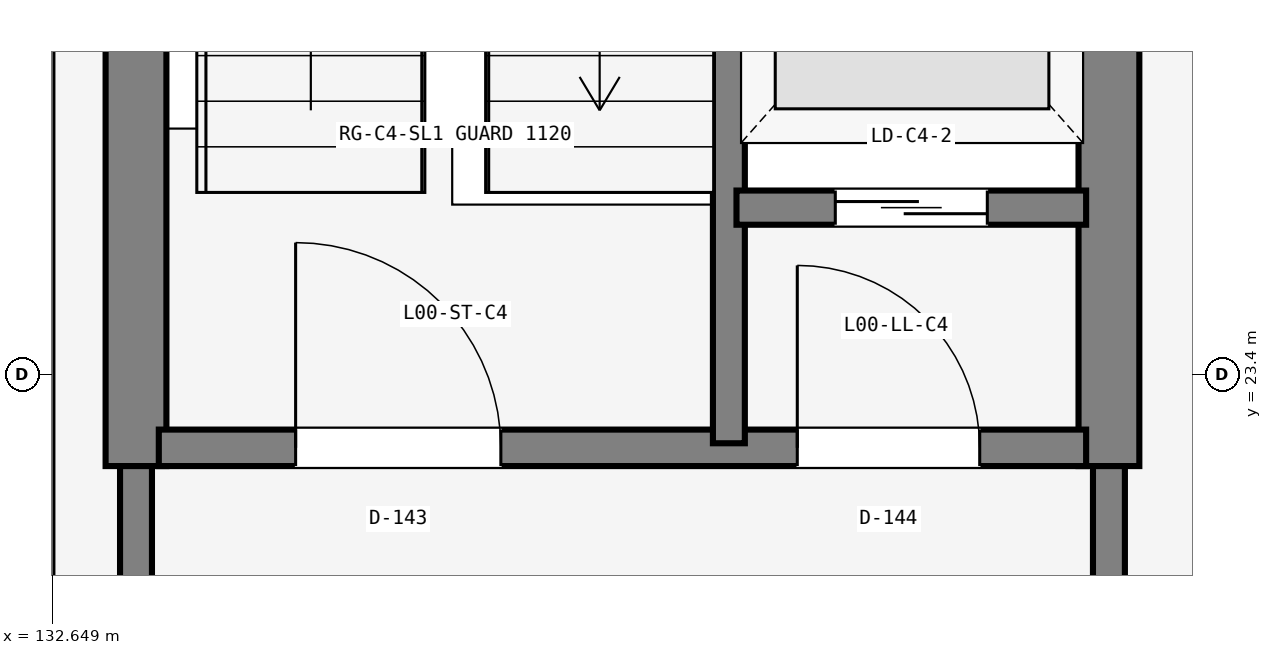
"""IFC4 building model, lengths in metres.
Left out: names, types, materials, properties, quantities, classifications, styles, units other than length and angle.
Written with IfcOpenShell. Run it as: python <this file> out.ifc"""

import sys

from ifc_helpers import new_model, si_unit, direction, frame, frame_2d, origin, origin_2d, place, context, subcontext, project, spatial, rectangle, extrude, element, fill, save


model = new_model("IFC4")
c1 = context("Model", 3, precision=1e-05, world=origin(), true_north=direction((0.0, 1.0)))
c2 = subcontext(c1, "Body", "Model", "MODEL_VIEW")
j1 = project(units=[si_unit("LENGTHUNIT", "METRE"), si_unit("PLANEANGLEUNIT", "RADIAN")], contexts=[c1])
p1 = place(None, origin())
s1 = spatial("IfcSite", under=j1, at=p1, CompositionType="ELEMENT")
p2 = place(p1, origin())
s2 = spatial("IfcBuilding", under=s1, at=p2, CompositionType="ELEMENT")
p3 = place(p2, origin())
s3 = spatial("IfcBuildingStorey", under=s2, at=p3, CompositionType="ELEMENT", Elevation=0.0)
for number, where, z_axis, x_axis in (
    (1, (132.6, 24.0, 0.0), (0.0, 0.0, 1.0), (1.0, 0.0, 0.0)),
    (2, (140.4, 24.0, 0.0), (0.0, 0.0, 1.0), (1.0, 0.0, 0.0)),
):
    element("IfcColumn", number, at=place(p3, frame(where, z_axis=z_axis, x_axis=x_axis)), inside=s3, PredefinedType="COLUMN", context=c2, shape_type="SweptSolid", body=[
        extrude(rectangle(XDim=0.75, YDim=0.75, at=origin_2d()), origin(), (0.0, 0.0, 1.0), 5.4),
    ])
for number, where, z_axis, x_axis in (
    (3, (133.2, 22.8, 0.0), (0.0, 0.0, 1.0), (0.0, 1.0, 0.0)),
    (4, (139.6, 22.8, 0.0), (0.0, 0.0, 1.0), (0.0, 1.0, 0.0)),
):
    element("IfcWall", number, at=place(p3, frame(where, z_axis=z_axis, x_axis=x_axis)), inside=s3, PredefinedType="SHEAR", context=c2, shape_type="SweptSolid", body=[
        extrude(rectangle(XDim=8.6, YDim=0.4, at=frame_2d((4.3, 0.0))), origin(), (0.0, 0.0, 1.0), 5.4),
    ])
p4 = place(p3, frame((133.35, 22.92, 0.0), z_axis=(0.0, 0.0, 1.0), x_axis=(1.0, 0.0, 0.0)))
e5 = element("IfcWall", 5, at=p4, inside=s3, PredefinedType="PARTITIONING", context=c2, shape_type="SweptSolid", body=[
    extrude(rectangle(XDim=6.1, YDim=0.24, at=frame_2d((3.05, 0.0))), origin(), (0.0, 0.0, 1.0), 4.46),
])
p5 = place(p4, frame((0.9, 0.0, 0.0)))
e6 = element("IfcOpeningElement", 6, at=p5, cuts=e5, PredefinedType="OPENING", context=c2, shape_type="SweptSolid", body=[
    extrude(rectangle(XDim=1.35, YDim=2.2, at=frame_2d((0.675, 1.1))), frame((0.0, 0.13, 0.0), z_axis=(0.0, -1.0, 0.0), x_axis=(1.0, 0.0, 0.0)), (0.0, 0.0, 1.0), 0.26),
])
p6 = place(p4, frame((4.2, 0.0, 0.0)))
e7 = element("IfcOpeningElement", 7, at=p6, cuts=e5, PredefinedType="OPENING", context=c2, shape_type="SweptSolid", body=[
    extrude(rectangle(XDim=1.2, YDim=2.2, at=frame_2d((0.6, 1.1))), frame((0.0, 0.13, 0.0), z_axis=(0.0, -1.0, 0.0), x_axis=(1.0, 0.0, 0.0)), (0.0, 0.0, 1.0), 0.26),
])
p7 = place(p3, frame((137.1, 22.95, 0.0), z_axis=(0.0, 0.0, 1.0), x_axis=(0.0, 1.0, 0.0)))
e8 = element("IfcWall", 8, at=p7, inside=s3, PredefinedType="PARTITIONING", context=c2, shape_type="SweptSolid", body=[
    extrude(rectangle(XDim=8.3, YDim=0.21, at=frame_2d((4.15, 0.0))), origin(), (0.0, 0.0, 1.0), 4.46),
])
p8 = place(p3, frame((137.15, 24.5, 0.0), z_axis=(0.0, 0.0, 1.0), x_axis=(1.0, 0.0, 0.0)))
e9 = element("IfcWall", 9, at=p8, inside=s3, PredefinedType="PARTITIONING", context=c2, shape_type="SweptSolid", body=[
    extrude(rectangle(XDim=2.3, YDim=0.225, at=frame_2d((1.15, 0.0))), origin(), (0.0, 0.0, 1.0), 4.46),
])
p9 = place(p8, frame((0.65, 0.0, 0.0)))
e10 = element("IfcOpeningElement", 10, at=p9, cuts=e9, PredefinedType="OPENING", context=c2, shape_type="SweptSolid", body=[
    extrude(rectangle(XDim=1.0, YDim=2.15, at=frame_2d((0.5, 1.075))), frame((0.0, 0.123, 0.0), z_axis=(0.0, -1.0, 0.0), x_axis=(1.0, 0.0, 0.0)), (0.0, 0.0, 1.0), 0.245),
])
p10 = place(p3, frame((139.6, 0.8, 0.0), z_axis=(0.0, 0.0, 1.0), x_axis=(0.0, 1.0, 0.0)))
e11 = element("IfcWall", 11, at=p10, inside=s3, PredefinedType="PARTITIONING", context=c2, shape_type="SweptSolid", body=[
    extrude(rectangle(XDim=22.0, YDim=0.21, at=frame_2d((11.0, 0.0))), origin(), (0.0, 0.0, 1.0), 3.45),
])
p11 = place(p3, frame((133.2, 0.8, 0.0), z_axis=(0.0, 0.0, 1.0), x_axis=(0.0, 1.0, 0.0)))
e12 = element("IfcWall", 12, at=p11, inside=s3, PredefinedType="PARTITIONING", context=c2, shape_type="SweptSolid", body=[
    extrude(rectangle(XDim=22.0, YDim=0.21, at=frame_2d((11.0, 0.0))), origin(), (0.0, 0.0, 1.0), 3.45),
])
p12 = place(p11, frame((15.8, 0.0, 0.0)))
e13 = element("IfcOpeningElement", 13, at=p12, cuts=e12, PredefinedType="OPENING", context=c2, shape_type="SweptSolid", body=[
    extrude(rectangle(XDim=1.35, YDim=2.2, at=frame_2d((0.675, 1.1))), frame((0.0, 0.115, 0.0), z_axis=(0.0, -1.0, 0.0), x_axis=(1.0, 0.0, 0.0)), (0.0, 0.0, 1.0), 0.23),
])
p13 = place(p5, origin())
e14 = element("IfcDoor", 14, at=p13, inside=s3, OperationType="SINGLE_SWING_RIGHT", PredefinedType="DOOR", context=c2, shape_type="SweptSolid", body=[
    extrude(rectangle(XDim=1.35, YDim=2.2, at=frame_2d((0.675, 1.1))), frame((0.0, 0.025, 0.0), z_axis=(0.0, -1.0, 0.0), x_axis=(1.0, 0.0, 0.0)), (0.0, 0.0, 1.0), 0.05),
])
fill(e6, e14)
p14 = place(p6, origin())
e15 = element("IfcDoor", 15, at=p14, inside=s3, OperationType="SINGLE_SWING_LEFT", PredefinedType="DOOR", context=c2, shape_type="SweptSolid", body=[
    extrude(rectangle(XDim=1.2, YDim=2.2, at=frame_2d((0.6, 1.1))), frame((0.0, 0.025, 0.0), z_axis=(0.0, -1.0, 0.0), x_axis=(1.0, 0.0, 0.0)), (0.0, 0.0, 1.0), 0.05),
])
fill(e7, e15)
p15 = place(p9, origin())
e16 = element("IfcDoor", 16, at=p15, inside=s3, OperationType="SLIDING_TO_RIGHT", PredefinedType="DOOR", context=c2, shape_type="SweptSolid", body=[
    extrude(rectangle(XDim=1.0, YDim=2.15, at=frame_2d((0.5, 1.075))), frame((0.0, 0.025, 0.0), z_axis=(0.0, -1.0, 0.0), x_axis=(1.0, 0.0, 0.0)), (0.0, 0.0, 1.0), 0.05),
])
fill(e10, e16)
save(model, sys.argv[1])
